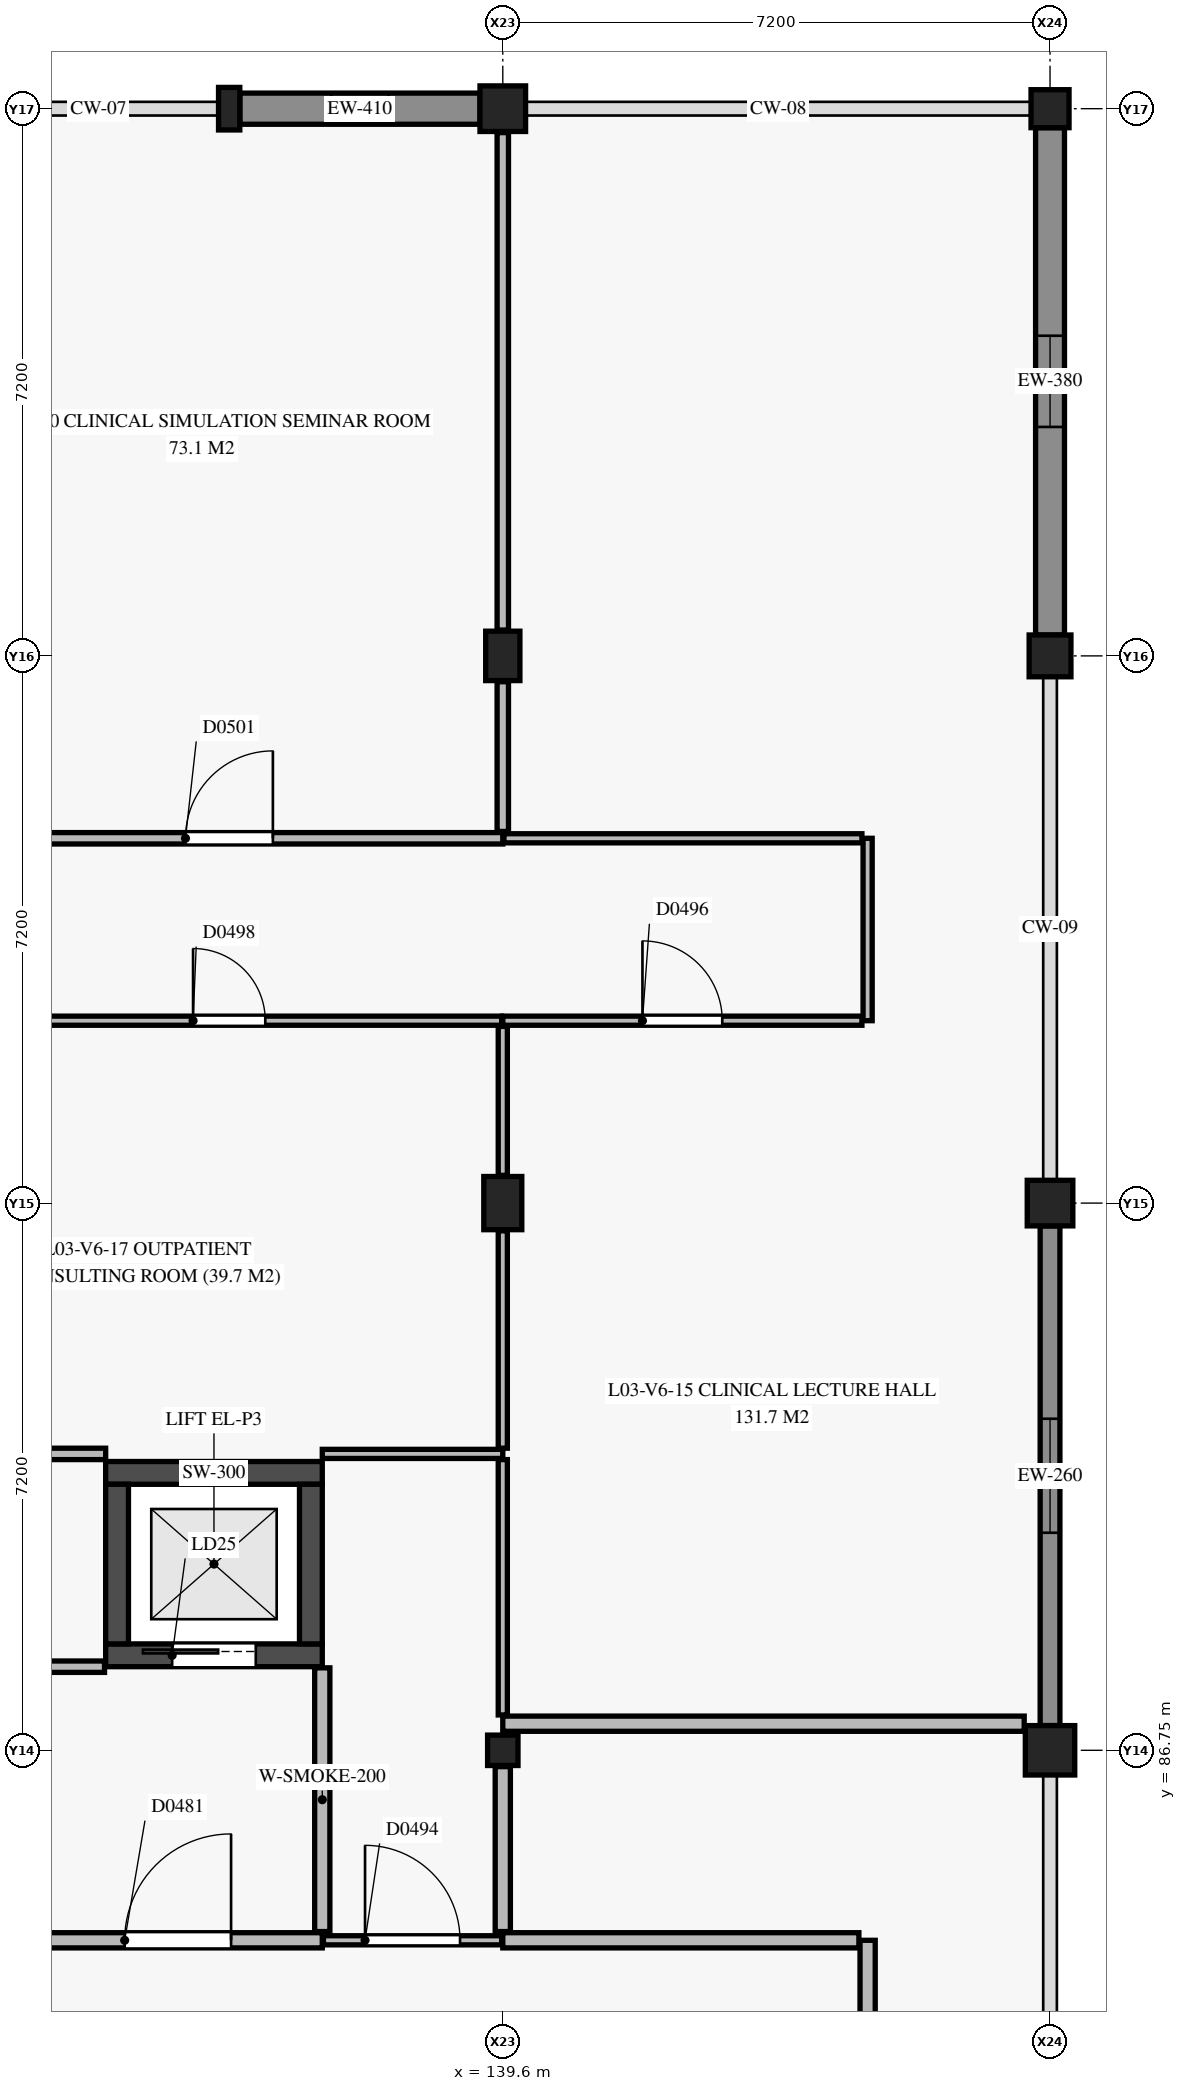
"""IFC4 building model, lengths in metres.
Left out: names, types, materials, properties, quantities, classifications, styles, units other than length and angle.
Written with IfcOpenShell. Run it as: python <this file> out.ifc"""

import sys

from ifc_helpers import new_model, si_unit, direction, frame, frame_2d, origin, origin_2d, place, context, subcontext, project, spatial, rectangle, circle, extrude, element, fill, save


model = new_model("IFC4")
c1 = context("Model", 3, precision=1e-05, world=origin(), true_north=direction((0.0, 1.0)))
c2 = subcontext(c1, "Body", "Model", "MODEL_VIEW")
j1 = project(units=[si_unit("LENGTHUNIT", "METRE"), si_unit("PLANEANGLEUNIT", "RADIAN")], contexts=[c1])
p1 = place(None, origin())
s1 = spatial("IfcSite", under=j1, at=p1, CompositionType="ELEMENT")
p2 = place(p1, origin())
s2 = spatial("IfcBuilding", under=s1, at=p2, CompositionType="ELEMENT")
p3 = place(p2, frame((0.0, 0.0, 13.2)))
s3 = spatial("IfcBuildingStorey", under=s2, at=p3, CompositionType="ELEMENT", Elevation=13.2)
p4 = place(p3, frame((139.6, 86.75, 0.0), z_axis=(0.0, 0.0, 1.0), x_axis=(1.0, 0.0, 0.0)))
e1 = element("IfcColumn", 1, at=p4, inside=s3, PredefinedType="COLUMN", context=c2, shape_type="SweptSolid", body=[
    extrude(rectangle(XDim=0.4, YDim=0.4, at=origin_2d()), origin(), (0.0, 0.0, 1.0), 4.2),
])
p5 = place(p3, frame((139.6, 93.95, 0.0), z_axis=(0.0, 0.0, 1.0), x_axis=(1.0, 0.0, 0.0)))
e2 = element("IfcColumn", 2, at=p5, inside=s3, PredefinedType="COLUMN", context=c2, shape_type="SweptSolid", body=[
    extrude(rectangle(XDim=0.5, YDim=0.7, at=origin_2d()), origin(), (0.0, 0.0, 1.0), 4.2),
])
p6 = place(p3, frame((139.6, 101.15, 0.0), z_axis=(0.0, 0.0, 1.0), x_axis=(1.0, 0.0, 0.0)))
e3 = element("IfcColumn", 3, at=p6, inside=s3, PredefinedType="COLUMN", context=c2, shape_type="SweptSolid", body=[
    extrude(rectangle(XDim=0.45, YDim=0.65, at=origin_2d()), origin(), (0.0, 0.0, 1.0), 4.05),
])
p7 = place(p3, frame((139.6, 108.35, 0.0), z_axis=(0.0, 0.0, 1.0), x_axis=(1.0, 0.0, 0.0)))
e4 = element("IfcColumn", 4, at=p7, inside=s3, PredefinedType="COLUMN", context=c2, shape_type="SweptSolid", body=[
    extrude(circle(Radius=0.3, at=origin_2d()), origin(), (0.0, 0.0, 1.0), 4.36),
])
p8 = place(p3, frame((146.8, 86.75, 0.0), z_axis=(0.0, 0.0, 1.0), x_axis=(1.0, 0.0, 0.0)))
e5 = element("IfcColumn", 5, at=p8, inside=s3, PredefinedType="COLUMN", context=c2, shape_type="SweptSolid", body=[
    extrude(rectangle(XDim=0.65, YDim=0.65, at=origin_2d()), origin(), (0.0, 0.0, 1.0), 4.2),
])
p9 = place(p3, frame((146.8, 93.95, 0.0), z_axis=(0.0, 0.0, 1.0), x_axis=(1.0, 0.0, 0.0)))
e6 = element("IfcColumn", 6, at=p9, inside=s3, PredefinedType="COLUMN", context=c2, shape_type="SweptSolid", body=[
    extrude(rectangle(XDim=0.6, YDim=0.6, at=origin_2d()), origin(), (0.0, 0.0, 1.0), 4.2),
])
p10 = place(p3, frame((146.8, 101.15, 0.0), z_axis=(0.0, 0.0, 1.0), x_axis=(1.0, 0.0, 0.0)))
e7 = element("IfcColumn", 7, at=p10, inside=s3, PredefinedType="COLUMN", context=c2, shape_type="SweptSolid", body=[
    extrude(rectangle(XDim=0.55, YDim=0.55, at=origin_2d()), origin(), (0.0, 0.0, 1.0), 4.05),
])
p11 = place(p3, frame((146.8, 108.35, 0.0), z_axis=(0.0, 0.0, 1.0), x_axis=(1.0, 0.0, 0.0)))
e8 = element("IfcColumn", 8, at=p11, inside=s3, PredefinedType="COLUMN", context=c2, shape_type="SweptSolid", body=[
    extrude(rectangle(XDim=0.5, YDim=0.5, at=origin_2d()), origin(), (0.0, 0.0, 1.0), 4.36),
])
p12 = place(p3, frame((136.0, 108.35, 0.0), z_axis=(0.0, 0.0, 1.0), x_axis=(1.0, 0.0, 0.0)))
e9 = element("IfcColumn", 9, at=p12, inside=s3, PredefinedType="PILASTER", context=c2, shape_type="SweptSolid", body=[
    extrude(rectangle(XDim=0.28, YDim=0.56, at=origin_2d()), origin(), (0.0, 0.0, 1.0), 4.2),
])
p13 = place(p3, frame((134.375, 88.0, 0.0), z_axis=(0.0, 0.0, 1.0), x_axis=(1.0, 0.0, 0.0)))
e10 = element("IfcWall", 10, at=p13, inside=s3, PredefinedType="SHEAR", context=c2, shape_type="SweptSolid", body=[
    extrude(rectangle(XDim=2.85, YDim=0.3, at=frame_2d((1.425, 0.0))), origin(), (0.0, 0.0, 1.0), 3.95),
])
p14 = place(p13, frame((0.875, 0.0, 0.0)))
e11 = element("IfcOpeningElement", 11, at=p14, cuts=e10, PredefinedType="OPENING", context=c2, shape_type="SweptSolid", body=[
    extrude(rectangle(XDim=1.1, YDim=2.15, at=frame_2d((0.55, 1.075))), frame((0.0, 0.16, 0.0), z_axis=(0.0, -1.0, 0.0), x_axis=(1.0, 0.0, 0.0)), (0.0, 0.0, 1.0), 0.32),
])
p15 = place(p3, frame((134.375, 90.4, 0.0), z_axis=(0.0, 0.0, 1.0), x_axis=(1.0, 0.0, 0.0)))
e12 = element("IfcWall", 12, at=p15, inside=s3, PredefinedType="SHEAR", context=c2, shape_type="SweptSolid", body=[
    extrude(rectangle(XDim=2.85, YDim=0.3, at=frame_2d((1.425, 0.0))), origin(), (0.0, 0.0, 1.0), 3.95),
])
for number, where, z_axis, x_axis in (
    (13, (134.525, 88.15, 0.0), (0.0, 0.0, 1.0), (0.0, 1.0, 0.0)),
    (14, (137.075, 88.15, 0.0), (0.0, 0.0, 1.0), (0.0, 1.0, 0.0)),
):
    element("IfcWall", number, at=place(p3, frame(where, z_axis=z_axis, x_axis=x_axis)), inside=s3, PredefinedType="SHEAR", context=c2, shape_type="SweptSolid", body=[
        extrude(rectangle(XDim=2.1, YDim=0.3, at=frame_2d((1.05, 0.0))), origin(), (0.0, 0.0, 1.0), 3.95),
    ])
p16 = place(p3, frame((136.14, 108.35, 0.0), z_axis=(0.0, 0.0, 1.0), x_axis=(1.0, 0.0, 0.0)))
e15 = element("IfcWall", 15, at=p16, inside=s3, PredefinedType="USERDEFINED", context=c2, shape_type="SweptSolid", body=[
    extrude(rectangle(XDim=3.16, YDim=0.41, at=frame_2d((1.58, 0.0))), origin(), (0.0, 0.0, 1.0), 3.13),
])
p17 = place(p16, frame((1.205, 0.0, 0.9)))
e16 = element("IfcOpeningElement", 16, at=p17, cuts=e15, PredefinedType="OPENING", context=c2, shape_type="SweptSolid", body=[
    extrude(rectangle(XDim=0.75, YDim=1.8, at=frame_2d((0.375, 0.9))), frame((0.0, 0.215, 0.0), z_axis=(0.0, -1.0, 0.0), x_axis=(1.0, 0.0, 0.0)), (0.0, 0.0, 1.0), 0.43),
])
p18 = place(p3, frame((146.8, 108.1, 0.0), z_axis=(0.0, 0.0, 1.0), x_axis=(0.0, -1.0, 0.0)))
e17 = element("IfcWall", 17, at=p18, inside=s3, PredefinedType="USERDEFINED", context=c2, shape_type="SweptSolid", body=[
    extrude(rectangle(XDim=6.675, YDim=0.38, at=frame_2d((3.337, 0.0))), origin(), (0.0, 0.0, 1.0), 3.13),
])
p19 = place(p18, frame((2.738, 0.0, 0.9)))
e18 = element("IfcOpeningElement", 18, at=p19, cuts=e17, PredefinedType="OPENING", context=c2, shape_type="SweptSolid", body=[
    extrude(rectangle(XDim=1.2, YDim=1.5, at=frame_2d((0.6, 0.75))), frame((0.0, 0.2, 0.0), z_axis=(0.0, -1.0, 0.0), x_axis=(1.0, 0.0, 0.0)), (0.0, 0.0, 1.0), 0.4),
])
p20 = place(p3, frame((146.8, 93.65, 0.0), z_axis=(0.0, 0.0, 1.0), x_axis=(0.0, -1.0, 0.0)))
e19 = element("IfcWall", 19, at=p20, inside=s3, PredefinedType="SOLIDWALL", context=c2, shape_type="SweptSolid", body=[
    extrude(rectangle(XDim=6.575, YDim=0.26, at=frame_2d((3.288, 0.0))), origin(), (0.0, 0.0, 1.0), 3.13),
])
p21 = place(p20, frame((2.538, 0.0, 0.9)))
e20 = element("IfcOpeningElement", 20, at=p21, cuts=e19, PredefinedType="OPENING", context=c2, shape_type="SweptSolid", body=[
    extrude(rectangle(XDim=1.5, YDim=1.5, at=frame_2d((0.75, 0.75))), frame((0.0, 0.14, 0.0), z_axis=(0.0, -1.0, 0.0), x_axis=(1.0, 0.0, 0.0)), (0.0, 0.0, 1.0), 0.28),
])
p22 = place(p3, frame((133.425, 84.25, 0.0), z_axis=(0.0, 0.0, 1.0), x_axis=(1.0, 0.0, 0.0)))
e21 = element("IfcWall", 21, at=p22, inside=s3, PredefinedType="PARTITIONING", context=c2, shape_type="SweptSolid", body=[
    extrude(rectangle(XDim=3.8, YDim=0.2, at=frame_2d((1.9, 0.0))), origin(), (0.0, 0.0, 1.0), 3.475),
])
p23 = place(p22, frame((1.2, 0.0, 0.0)))
e22 = element("IfcOpeningElement", 22, at=p23, cuts=e21, PredefinedType="OPENING", context=c2, shape_type="SweptSolid", body=[
    extrude(rectangle(XDim=1.4, YDim=2.2, at=frame_2d((0.7, 1.1))), frame((0.0, 0.11, 0.0), z_axis=(0.0, -1.0, 0.0), x_axis=(1.0, 0.0, 0.0)), (0.0, 0.0, 1.0), 0.22),
])
p24 = place(p3, frame((137.225, 84.365, 0.0), z_axis=(0.0, 0.0, 1.0), x_axis=(0.0, 1.0, 0.0)))
e23 = element("IfcWall", 23, at=p24, inside=s3, PredefinedType="PARTITIONING", context=c2, shape_type="SweptSolid", body=[
    extrude(rectangle(XDim=3.47, YDim=0.2, at=frame_2d((1.735, 0.0))), origin(), (0.0, 0.0, 1.0), 3.415),
])
p25 = place(p3, frame((144.4, 81.965, 0.0), z_axis=(0.0, 0.0, 1.0), x_axis=(0.0, 1.0, 0.0)))
e24 = element("IfcWall", 24, at=p25, inside=s3, PredefinedType="PARTITIONING", context=c2, shape_type="SweptSolid", body=[
    extrude(rectangle(XDim=2.285, YDim=0.2, at=frame_2d((1.143, 0.0))), origin(), (0.0, 0.0, 1.0), 3.475),
])
p26 = place(p3, frame((139.6, 84.25, 0.0), z_axis=(0.0, 0.0, 1.0), x_axis=(1.0, 0.0, 0.0)))
e25 = element("IfcWall", 25, at=p26, inside=s3, PredefinedType="PARTITIONING", context=c2, shape_type="SweptSolid", body=[
    extrude(rectangle(XDim=4.685, YDim=0.2, at=frame_2d((2.342, 0.0))), origin(), (0.0, 0.0, 1.0), 3.355),
])
p27 = place(p3, frame((132.4, 98.75, 0.0), z_axis=(0.0, 0.0, 1.0), x_axis=(1.0, 0.0, 0.0)))
e26 = element("IfcWall", 26, at=p27, inside=s3, PredefinedType="PARTITIONING", context=c2, shape_type="SweptSolid", body=[
    extrude(rectangle(XDim=7.2, YDim=0.15, at=frame_2d((3.6, 0.0))), origin(), (0.0, 0.0, 1.0), 3.355),
])
p28 = place(p27, frame((3.025, 0.0, 0.0)))
e27 = element("IfcOpeningElement", 27, at=p28, cuts=e26, PredefinedType="OPENING", context=c2, shape_type="SweptSolid", body=[
    extrude(rectangle(XDim=1.15, YDim=2.15, at=frame_2d((0.575, 1.075))), frame((0.0, 0.085, 0.0), z_axis=(0.0, -1.0, 0.0), x_axis=(1.0, 0.0, 0.0)), (0.0, 0.0, 1.0), 0.17),
])
p29 = place(p3, frame((137.24, 84.25, 0.0), z_axis=(0.0, 0.0, 1.0), x_axis=(1.0, 0.0, 0.0)))
e28 = element("IfcWall", 28, at=p29, inside=s3, PredefinedType="PARTITIONING", context=c2, shape_type="SweptSolid", body=[
    extrude(rectangle(XDim=2.345, YDim=0.12, at=frame_2d((1.172, 0.0))), origin(), (0.0, 0.0, 1.0), 3.355),
])
p30 = place(p29, frame((0.548, 0.0, 0.0)))
e29 = element("IfcOpeningElement", 29, at=p30, cuts=e28, PredefinedType="OPENING", context=c2, shape_type="SweptSolid", body=[
    extrude(rectangle(XDim=1.25, YDim=2.15, at=frame_2d((0.625, 1.075))), frame((0.0, 0.07, 0.0), z_axis=(0.0, -1.0, 0.0), x_axis=(1.0, 0.0, 0.0)), (0.0, 0.0, 1.0), 0.14),
])
p31 = place(p3, frame((144.4, 96.35, 0.0), z_axis=(0.0, 0.0, 1.0), x_axis=(0.0, 1.0, 0.0)))
e30 = element("IfcWall", 30, at=p31, inside=s3, PredefinedType="PARTITIONING", context=c2, shape_type="SweptSolid", body=[
    extrude(rectangle(XDim=2.4, YDim=0.12, at=frame_2d((1.2, 0.0))), origin(), (0.0, 0.0, 1.0), 3.95),
])
p32 = place(p3, frame((139.615, 98.75, 0.0), z_axis=(0.0, 0.0, 1.0), x_axis=(1.0, 0.0, 0.0)))
e31 = element("IfcWall", 31, at=p32, inside=s3, PredefinedType="PARTITIONING", context=c2, shape_type="SweptSolid", body=[
    extrude(rectangle(XDim=4.71, YDim=0.12, at=frame_2d((2.355, 0.0))), origin(), (0.0, 0.0, 1.0), 3.95),
])
p33 = place(p3, frame((139.6, 96.35, 0.0), z_axis=(0.0, 0.0, 1.0), x_axis=(1.0, 0.0, 0.0)))
e32 = element("IfcWall", 32, at=p33, inside=s3, PredefinedType="PARTITIONING", context=c2, shape_type="SweptSolid", body=[
    extrude(rectangle(XDim=4.725, YDim=0.12, at=frame_2d((2.362, 0.0))), origin(), (0.0, 0.0, 1.0), 3.95),
])
p34 = place(p33, frame((1.837, 0.0, 0.0)))
e33 = element("IfcOpeningElement", 33, at=p34, cuts=e32, PredefinedType="OPENING", context=c2, shape_type="SweptSolid", body=[
    extrude(rectangle(XDim=1.05, YDim=2.15, at=frame_2d((0.525, 1.075))), frame((0.0, 0.07, 0.0), z_axis=(0.0, -1.0, 0.0), x_axis=(1.0, 0.0, 0.0)), (0.0, 0.0, 1.0), 0.14),
])
p35 = place(p3, frame((132.415, 96.35, 0.0), z_axis=(0.0, 0.0, 1.0), x_axis=(1.0, 0.0, 0.0)))
e34 = element("IfcWall", 34, at=p35, inside=s3, PredefinedType="PARTITIONING", context=c2, shape_type="SweptSolid", body=[
    extrude(rectangle(XDim=7.17, YDim=0.12, at=frame_2d((3.585, 0.0))), origin(), (0.0, 0.0, 1.0), 3.355),
])
p36 = place(p35, frame((3.11, 0.0, 0.0)))
e35 = element("IfcOpeningElement", 35, at=p36, cuts=e34, PredefinedType="OPENING", context=c2, shape_type="SweptSolid", body=[
    extrude(rectangle(XDim=0.95, YDim=2.1, at=frame_2d((0.475, 1.05))), frame((0.0, 0.07, 0.0), z_axis=(0.0, -1.0, 0.0), x_axis=(1.0, 0.0, 0.0)), (0.0, 0.0, 1.0), 0.14),
])
p37 = place(p3, frame((139.6, 84.365, 0.0), z_axis=(0.0, 0.0, 1.0), x_axis=(0.0, 1.0, 0.0)))
e36 = element("IfcWall", 36, at=p37, inside=s3, PredefinedType="PARTITIONING", context=c2, shape_type="SweptSolid", body=[
    extrude(rectangle(XDim=2.17, YDim=0.2, at=frame_2d((1.085, 0.0))), origin(), (0.0, 0.0, 1.0), 3.355),
])
p38 = place(p3, frame((139.6, 87.1, 0.0), z_axis=(0.0, 0.0, 1.0), x_axis=(1.0, 0.0, 0.0)))
e37 = element("IfcWall", 37, at=p38, inside=s3, PredefinedType="PARTITIONING", context=c2, shape_type="SweptSolid", body=[
    extrude(rectangle(XDim=6.86, YDim=0.2, at=frame_2d((3.43, 0.0))), origin(), (0.0, 0.0, 1.0), 3.385),
])
p39 = place(p3, frame((132.49, 90.65, 0.0), z_axis=(0.0, 0.0, 1.0), x_axis=(1.0, 0.0, 0.0)))
e38 = element("IfcWall", 38, at=p39, inside=s3, PredefinedType="PARTITIONING", context=c2, shape_type="SweptSolid", body=[
    extrude(rectangle(XDim=1.885, YDim=0.15, at=frame_2d((0.942, 0.0))), origin(), (0.0, 0.0, 1.0), 3.235),
])
p40 = place(p3, frame((133.54, 87.85, 0.0), z_axis=(0.0, 0.0, 1.0), x_axis=(1.0, 0.0, 0.0)))
e39 = element("IfcWall", 39, at=p40, inside=s3, PredefinedType="PARTITIONING", context=c2, shape_type="SweptSolid", body=[
    extrude(rectangle(XDim=0.82, YDim=0.15, at=frame_2d((0.41, 0.0))), origin(), (0.0, 0.0, 1.0), 3.95),
])
p41 = place(p3, frame((139.6, 98.84, 0.0), z_axis=(0.0, 0.0, 1.0), x_axis=(0.0, 1.0, 0.0)))
e40 = element("IfcWall", 40, at=p41, inside=s3, PredefinedType="PARTITIONING", context=c2, shape_type="SweptSolid", body=[
    extrude(rectangle(XDim=1.97, YDim=0.15, at=frame_2d((0.985, 0.0))), origin(), (0.0, 0.0, 1.0), 3.95),
])
p42 = place(p3, frame((139.6, 101.49, 0.0), z_axis=(0.0, 0.0, 1.0), x_axis=(0.0, 1.0, 0.0)))
e41 = element("IfcWall", 41, at=p42, inside=s3, PredefinedType="PARTITIONING", context=c2, shape_type="SweptSolid", body=[
    extrude(rectangle(XDim=6.545, YDim=0.15, at=frame_2d((3.272, 0.0))), origin(), (0.0, 0.0, 1.0), 3.95),
])
p43 = place(p3, frame((137.225, 90.65, 0.0), z_axis=(0.0, 0.0, 1.0), x_axis=(1.0, 0.0, 0.0)))
e42 = element("IfcWall", 42, at=p43, inside=s3, PredefinedType="PARTITIONING", context=c2, shape_type="SweptSolid", body=[
    extrude(rectangle(XDim=2.375, YDim=0.12, at=frame_2d((1.188, 0.0))), origin(), (0.0, 0.0, 1.0), 3.385),
])
p44 = place(p3, frame((139.6, 87.215, 0.0), z_axis=(0.0, 0.0, 1.0), x_axis=(0.0, 1.0, 0.0)))
e43 = element("IfcWall", 43, at=p44, inside=s3, PredefinedType="PARTITIONING", context=c2, shape_type="SweptSolid", body=[
    extrude(rectangle(XDim=3.36, YDim=0.12, at=frame_2d((1.68, 0.0))), origin(), (0.0, 0.0, 1.0), 3.385),
])
p45 = place(p3, frame((139.6, 90.725, 0.0), z_axis=(0.0, 0.0, 1.0), x_axis=(0.0, 1.0, 0.0)))
e44 = element("IfcWall", 44, at=p45, inside=s3, PredefinedType="PARTITIONING", context=c2, shape_type="SweptSolid", body=[
    extrude(rectangle(XDim=2.86, YDim=0.12, at=frame_2d((1.43, 0.0))), origin(), (0.0, 0.0, 1.0), 3.385),
])
p46 = place(p3, frame((139.6, 94.315, 0.0), z_axis=(0.0, 0.0, 1.0), x_axis=(0.0, 1.0, 0.0)))
e45 = element("IfcWall", 45, at=p46, inside=s3, PredefinedType="PARTITIONING", context=c2, shape_type="SweptSolid", body=[
    extrude(rectangle(XDim=1.96, YDim=0.12, at=frame_2d((0.98, 0.0))), origin(), (0.0, 0.0, 1.0), 3.95),
])
p47 = place(p17, origin())
e46 = element("IfcWindow", 46, at=p47, inside=s3, PartitioningType="SINGLE_PANEL", PredefinedType="WINDOW", context=c2, shape_type="SweptSolid", body=[
    extrude(rectangle(XDim=0.75, YDim=1.8, at=frame_2d((0.375, 0.9))), frame((0.0, 0.03, 0.0), z_axis=(0.0, -1.0, 0.0), x_axis=(1.0, 0.0, 0.0)), (0.0, 0.0, 1.0), 0.06),
])
fill(e16, e46)
p48 = place(p19, origin())
e47 = element("IfcWindow", 47, at=p48, inside=s3, PartitioningType="SINGLE_PANEL", PredefinedType="WINDOW", context=c2, shape_type="SweptSolid", body=[
    extrude(rectangle(XDim=1.2, YDim=1.5, at=frame_2d((0.6, 0.75))), frame((0.0, 0.03, 0.0), z_axis=(0.0, -1.0, 0.0), x_axis=(1.0, 0.0, 0.0)), (0.0, 0.0, 1.0), 0.06),
])
fill(e18, e47)
p49 = place(p21, origin())
e48 = element("IfcWindow", 48, at=p49, inside=s3, PartitioningType="SINGLE_PANEL", PredefinedType="WINDOW", context=c2, shape_type="SweptSolid", body=[
    extrude(rectangle(XDim=1.5, YDim=1.5, at=frame_2d((0.75, 0.75))), frame((0.0, 0.03, 0.0), z_axis=(0.0, -1.0, 0.0), x_axis=(1.0, 0.0, 0.0)), (0.0, 0.0, 1.0), 0.06),
])
fill(e20, e48)
p50 = place(p14, origin())
e49 = element("IfcDoor", 49, at=p50, inside=s3, OperationType="SLIDING_TO_LEFT", PredefinedType="DOOR", context=c2, shape_type="SweptSolid", body=[
    extrude(rectangle(XDim=1.1, YDim=2.15, at=frame_2d((0.55, 1.075))), frame((0.0, 0.025, 0.0), z_axis=(0.0, -1.0, 0.0), x_axis=(1.0, 0.0, 0.0)), (0.0, 0.0, 1.0), 0.05),
])
fill(e11, e49)
p51 = place(p23, origin())
e50 = element("IfcDoor", 50, at=p51, inside=s3, OperationType="SINGLE_SWING_RIGHT", PredefinedType="DOOR", context=c2, shape_type="SweptSolid", body=[
    extrude(rectangle(XDim=1.4, YDim=2.2, at=frame_2d((0.7, 1.1))), frame((0.0, 0.025, 0.0), z_axis=(0.0, -1.0, 0.0), x_axis=(1.0, 0.0, 0.0)), (0.0, 0.0, 1.0), 0.05),
])
fill(e22, e50)
p52 = place(p30, origin())
e51 = element("IfcDoor", 51, at=p52, inside=s3, OperationType="SINGLE_SWING_LEFT", PredefinedType="DOOR", context=c2, shape_type="SweptSolid", body=[
    extrude(rectangle(XDim=1.25, YDim=2.15, at=frame_2d((0.625, 1.075))), frame((0.0, 0.025, 0.0), z_axis=(0.0, -1.0, 0.0), x_axis=(1.0, 0.0, 0.0)), (0.0, 0.0, 1.0), 0.05),
])
fill(e29, e51)
p53 = place(p34, origin())
e52 = element("IfcDoor", 52, at=p53, inside=s3, OperationType="SINGLE_SWING_LEFT", PredefinedType="DOOR", context=c2, shape_type="SweptSolid", body=[
    extrude(rectangle(XDim=1.05, YDim=2.15, at=frame_2d((0.525, 1.075))), frame((0.0, 0.025, 0.0), z_axis=(0.0, -1.0, 0.0), x_axis=(1.0, 0.0, 0.0)), (0.0, 0.0, 1.0), 0.05),
])
fill(e33, e52)
p54 = place(p36, origin())
e53 = element("IfcDoor", 53, at=p54, inside=s3, OperationType="SINGLE_SWING_LEFT", PredefinedType="DOOR", context=c2, shape_type="SweptSolid", body=[
    extrude(rectangle(XDim=0.95, YDim=2.1, at=frame_2d((0.475, 1.05))), frame((0.0, 0.025, 0.0), z_axis=(0.0, -1.0, 0.0), x_axis=(1.0, 0.0, 0.0)), (0.0, 0.0, 1.0), 0.05),
])
fill(e35, e53)
p55 = place(p28, origin())
e54 = element("IfcDoor", 54, at=p55, inside=s3, OperationType="SINGLE_SWING_RIGHT", PredefinedType="DOOR", context=c2, shape_type="SweptSolid", body=[
    extrude(rectangle(XDim=1.15, YDim=2.15, at=frame_2d((0.575, 1.075))), frame((0.0, 0.025, 0.0), z_axis=(0.0, -1.0, 0.0), x_axis=(1.0, 0.0, 0.0)), (0.0, 0.0, 1.0), 0.05),
])
fill(e27, e54)
save(model, sys.argv[1])
